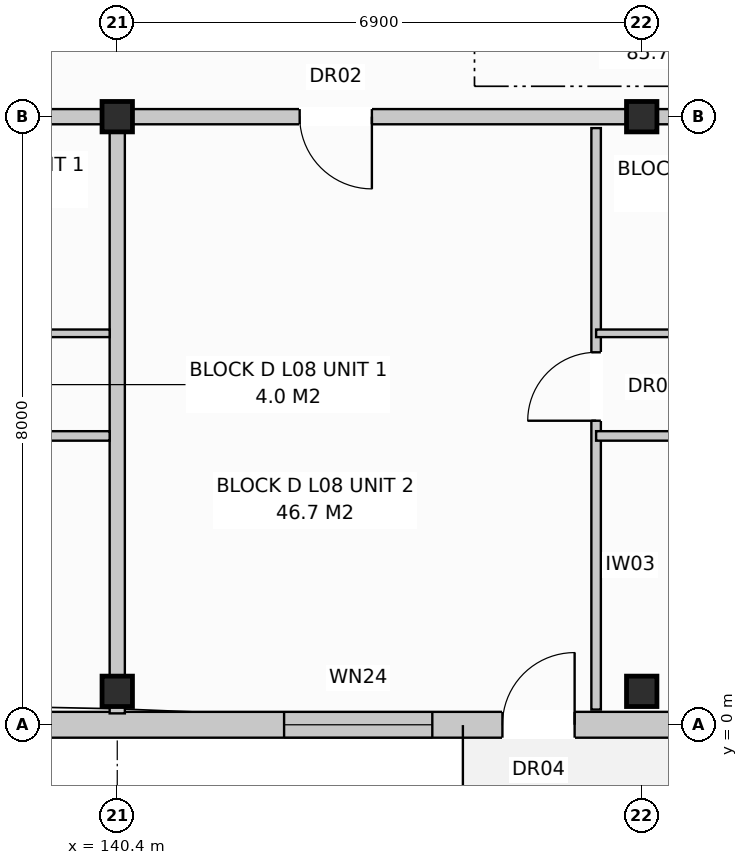
"""IFC4 building model, lengths in metres.
Left out: names, types, materials, properties, quantities, classifications, styles, units other than length and angle.
Written with IfcOpenShell. Run it as: python <this file> out.ifc"""

import sys

from ifc_helpers import new_model, si_unit, direction, frame, frame_2d, origin, origin_with_axes, origin_2d, place, context, subcontext, project, spatial, rectangle, extrude, element, fill, save


model = new_model("IFC4")
c1 = context("Model", 3, precision=1e-05, world=origin(), true_north=direction((0.0, 1.0)))
c2 = subcontext(c1, "Body", "Model", "MODEL_VIEW")
j1 = project(units=[si_unit("LENGTHUNIT", "METRE"), si_unit("PLANEANGLEUNIT", "RADIAN")], contexts=[c1])
p1 = place(None, origin())
s1 = spatial("IfcSite", under=j1, at=p1, CompositionType="ELEMENT")
p2 = place(p1, origin())
s2 = spatial("IfcBuilding", under=s1, at=p2, CompositionType="ELEMENT")
p3 = place(p2, frame((0.0, 0.0, 27.2)))
s3 = spatial("IfcBuildingStorey", under=s2, at=p3, CompositionType="ELEMENT", Elevation=27.2)
for number, where, z_axis, x_axis in (
    (1, (140.4, 0.44, 0.0), (0.0, 0.0, 1.0), (1.0, 0.0, 0.0)),
    (2, (140.4, 8.0, 0.0), (0.0, 0.0, 1.0), (1.0, 0.0, 0.0)),
    (3, (147.3, 0.44, 0.0), (0.0, 0.0, 1.0), (1.0, 0.0, 0.0)),
    (4, (147.3, 8.0, 0.0), (0.0, 0.0, 1.0), (1.0, 0.0, 0.0)),
):
    element("IfcColumn", number, at=place(p3, frame(where, z_axis=z_axis, x_axis=x_axis)), inside=s3, PredefinedType="COLUMN", context=c2, shape_type="SweptSolid", body=[
        extrude(rectangle(XDim=0.4, YDim=0.4, at=origin_2d()), origin(), (0.0, 0.0, 1.0), 3.2),
    ])
p4 = place(p3, frame((126.76, 0.0, 0.0), z_axis=(0.0, 0.0, 1.0), x_axis=(1.0, 0.0, 0.0)))
e5 = element("IfcWall", 5, at=p4, inside=s3, PredefinedType="STANDARD", context=c2, shape_type="SweptSolid", body=[
    extrude(rectangle(XDim=41.08, YDim=0.34, at=frame_2d((20.54, 0.0))), origin(), (0.0, 0.0, 1.0), 2.91),
])
p5 = place(p4, frame((7.41, 0.0, 0.0)))
e6 = element("IfcOpeningElement", 6, at=p5, cuts=e5, PredefinedType="OPENING", context=c2, shape_type="SweptSolid", body=[
    extrude(rectangle(XDim=0.95, YDim=2.1, at=frame_2d((0.475, 1.05))), frame((0.0, 0.182, 0.0), z_axis=(0.0, -1.0, 0.0), x_axis=(1.0, 0.0, 0.0)), (0.0, 0.0, 1.0), 0.364),
])
p6 = place(p4, frame((18.707, 0.0, 0.0)))
e7 = element("IfcOpeningElement", 7, at=p6, cuts=e5, PredefinedType="OPENING", context=c2, shape_type="SweptSolid", body=[
    extrude(rectangle(XDim=0.95, YDim=2.1, at=frame_2d((0.475, 1.05))), frame((0.0, 0.182, 0.0), z_axis=(0.0, -1.0, 0.0), x_axis=(1.0, 0.0, 0.0)), (0.0, 0.0, 1.0), 0.364),
])
p7 = place(p4, frame((32.707, 0.0, 0.0)))
e8 = element("IfcOpeningElement", 8, at=p7, cuts=e5, PredefinedType="OPENING", context=c2, shape_type="SweptSolid", body=[
    extrude(rectangle(XDim=0.95, YDim=2.1, at=frame_2d((0.475, 1.05))), frame((0.0, 0.182, 0.0), z_axis=(0.0, -1.0, 0.0), x_axis=(1.0, 0.0, 0.0)), (0.0, 0.0, 1.0), 0.364),
])
p8 = place(p4, frame((1.61, 0.0, 0.8)))
e9 = element("IfcOpeningElement", 9, at=p8, cuts=e5, PredefinedType="OPENING", context=c2, shape_type="SweptSolid", body=[
    extrude(rectangle(XDim=1.8, YDim=1.7, at=frame_2d((0.9, 0.85))), frame((0.0, 0.182, 0.0), z_axis=(0.0, -1.0, 0.0), x_axis=(1.0, 0.0, 0.0)), (0.0, 0.0, 1.0), 0.364),
])
p9 = place(p4, frame((10.46, 0.0, 0.8)))
e10 = element("IfcOpeningElement", 10, at=p9, cuts=e5, PredefinedType="OPENING", context=c2, shape_type="SweptSolid", body=[
    extrude(rectangle(XDim=1.9, YDim=1.85, at=frame_2d((0.95, 0.925))), frame((0.0, 0.182, 0.0), z_axis=(0.0, -1.0, 0.0), x_axis=(1.0, 0.0, 0.0)), (0.0, 0.0, 1.0), 0.364),
])
p10 = place(p4, frame((15.835, 0.0, 0.8)))
e11 = element("IfcOpeningElement", 11, at=p10, cuts=e5, PredefinedType="OPENING", context=c2, shape_type="SweptSolid", body=[
    extrude(rectangle(XDim=1.95, YDim=1.65, at=frame_2d((0.975, 0.825))), frame((0.0, 0.182, 0.0), z_axis=(0.0, -1.0, 0.0), x_axis=(1.0, 0.0, 0.0)), (0.0, 0.0, 1.0), 0.364),
])
p11 = place(p4, frame((21.96, 0.0, 0.72)))
e12 = element("IfcOpeningElement", 12, at=p11, cuts=e5, PredefinedType="OPENING", context=c2, shape_type="SweptSolid", body=[
    extrude(rectangle(XDim=1.1, YDim=1.5, at=frame_2d((0.55, 0.75))), frame((0.0, 0.182, 0.0), z_axis=(0.0, -1.0, 0.0), x_axis=(1.0, 0.0, 0.0)), (0.0, 0.0, 1.0), 0.364),
])
p12 = place(p4, frame((27.96, 0.0, 0.8)))
e13 = element("IfcOpeningElement", 13, at=p12, cuts=e5, PredefinedType="OPENING", context=c2, shape_type="SweptSolid", body=[
    extrude(rectangle(XDim=1.9, YDim=1.85, at=frame_2d((0.95, 0.925))), frame((0.0, 0.182, 0.0), z_axis=(0.0, -1.0, 0.0), x_axis=(1.0, 0.0, 0.0)), (0.0, 0.0, 1.0), 0.364),
])
p13 = place(p4, frame((30.81, 0.0, 0.85)))
e14 = element("IfcOpeningElement", 14, at=p13, cuts=e5, PredefinedType="OPENING", context=c2, shape_type="SweptSolid", body=[
    extrude(rectangle(XDim=1.5, YDim=1.65, at=frame_2d((0.75, 0.825))), frame((0.0, 0.182, 0.0), z_axis=(0.0, -1.0, 0.0), x_axis=(1.0, 0.0, 0.0)), (0.0, 0.0, 1.0), 0.364),
])
p14 = place(p4, frame((35.76, 0.0, 0.72)))
e15 = element("IfcOpeningElement", 15, at=p14, cuts=e5, PredefinedType="OPENING", context=c2, shape_type="SweptSolid", body=[
    extrude(rectangle(XDim=1.1, YDim=1.5, at=frame_2d((0.55, 0.75))), frame((0.0, 0.182, 0.0), z_axis=(0.0, -1.0, 0.0), x_axis=(1.0, 0.0, 0.0)), (0.0, 0.0, 1.0), 0.364),
])
p15 = place(p4, frame((38.575, 0.0, 0.8)))
e16 = element("IfcOpeningElement", 16, at=p15, cuts=e5, PredefinedType="OPENING", context=c2, shape_type="SweptSolid", body=[
    extrude(rectangle(XDim=1.9, YDim=1.85, at=frame_2d((0.95, 0.925))), frame((0.0, 0.182, 0.0), z_axis=(0.0, -1.0, 0.0), x_axis=(1.0, 0.0, 0.0)), (0.0, 0.0, 1.0), 0.364),
])
p16 = place(p3, frame((140.4, 7.85, 0.0), z_axis=(0.0, 0.0, 1.0), x_axis=(0.0, -1.0, 0.0)))
e17 = element("IfcWall", 17, at=p16, inside=s3, PredefinedType="PARTITIONING", context=c2, shape_type="SweptSolid", body=[
    extrude(rectangle(XDim=7.7, YDim=0.2, at=frame_2d((3.85, 0.0))), origin(), (0.0, 0.0, 1.0), 2.96),
])
p17 = place(p3, frame((126.6, 8.0, 0.0), z_axis=(0.0, 0.0, 1.0), x_axis=(1.0, 0.0, 0.0)))
e18 = element("IfcWall", 18, at=p17, inside=s3, PredefinedType="PARTITIONING", context=c2, shape_type="SweptSolid", body=[
    extrude(rectangle(XDim=13.8, YDim=0.2, at=frame_2d((6.9, 0.0))), origin(), (0.0, 0.0, 1.0), 2.35),
])
p18 = place(p17, frame((2.4, 0.0, 0.0)))
e19 = element("IfcOpeningElement", 19, at=p18, cuts=e18, PredefinedType="OPENING", context=c2, shape_type="SweptSolid", body=[
    extrude(rectangle(XDim=0.95, YDim=2.15, at=frame_2d((0.475, 1.075))), frame((0.0, 0.112, 0.0), z_axis=(0.0, -1.0, 0.0), x_axis=(1.0, 0.0, 0.0)), (0.0, 0.0, 1.0), 0.224),
])
p19 = place(p3, frame((131.8, 5.15, 0.0), z_axis=(0.0, 0.0, 1.0), x_axis=(1.0, 0.0, 0.0)))
e20 = element("IfcWall", 20, at=p19, inside=s3, PredefinedType="PARTITIONING", context=c2, shape_type="SweptSolid", body=[
    extrude(rectangle(XDim=8.5, YDim=0.1, at=frame_2d((4.25, 0.0))), origin(), (0.0, 0.0, 1.0), 2.96),
])
p20 = place(p19, frame((1.0, 0.0, 0.0)))
e21 = element("IfcOpeningElement", 21, at=p20, cuts=e20, PredefinedType="OPENING", context=c2, shape_type="SweptSolid", body=[
    extrude(rectangle(XDim=0.85, YDim=2.1, at=frame_2d((0.425, 1.05))), frame((0.0, 0.062, 0.0), z_axis=(0.0, -1.0, 0.0), x_axis=(1.0, 0.0, 0.0)), (0.0, 0.0, 1.0), 0.124),
])
p21 = place(p19, frame((3.4, 0.0, 0.0)))
e22 = element("IfcOpeningElement", 22, at=p21, cuts=e20, PredefinedType="OPENING", context=c2, shape_type="SweptSolid", body=[
    extrude(rectangle(XDim=0.85, YDim=2.05, at=frame_2d((0.425, 1.025))), frame((0.0, 0.062, 0.0), z_axis=(0.0, -1.0, 0.0), x_axis=(1.0, 0.0, 0.0)), (0.0, 0.0, 1.0), 0.124),
])
p22 = place(p19, frame((6.2, 0.0, 0.0)))
e23 = element("IfcOpeningElement", 23, at=p22, cuts=e20, PredefinedType="OPENING", context=c2, shape_type="SweptSolid", body=[
    extrude(rectangle(XDim=0.85, YDim=2.05, at=frame_2d((0.425, 1.025))), frame((0.0, 0.062, 0.0), z_axis=(0.0, -1.0, 0.0), x_axis=(1.0, 0.0, 0.0)), (0.0, 0.0, 1.0), 0.124),
])
p23 = place(p3, frame((131.8, 3.8, 0.0), z_axis=(0.0, 0.0, 1.0), x_axis=(1.0, 0.0, 0.0)))
e24 = element("IfcWall", 24, at=p23, inside=s3, PredefinedType="PARTITIONING", context=c2, shape_type="SweptSolid", body=[
    extrude(rectangle(XDim=8.5, YDim=0.125, at=frame_2d((4.25, 0.0))), origin(), (0.0, 0.0, 1.0), 2.96),
])
p24 = place(p23, frame((1.5, 0.0, 0.0)))
e25 = element("IfcOpeningElement", 25, at=p24, cuts=e24, PredefinedType="OPENING", context=c2, shape_type="SweptSolid", body=[
    extrude(rectangle(XDim=0.9, YDim=2.1, at=frame_2d((0.45, 1.05))), frame((0.0, 0.074, 0.0), z_axis=(0.0, -1.0, 0.0), x_axis=(1.0, 0.0, 0.0)), (0.0, 0.0, 1.0), 0.149),
])
p25 = place(p23, frame((5.6, 0.0, 0.0)))
e26 = element("IfcOpeningElement", 26, at=p25, cuts=e24, PredefinedType="OPENING", context=c2, shape_type="SweptSolid", body=[
    extrude(rectangle(XDim=0.9, YDim=2.1, at=frame_2d((0.45, 1.05))), frame((0.0, 0.074, 0.0), z_axis=(0.0, -1.0, 0.0), x_axis=(1.0, 0.0, 0.0)), (0.0, 0.0, 1.0), 0.149),
])
p26 = place(p3, frame((140.4, 8.0, 0.0), z_axis=(0.0, 0.0, 1.0), x_axis=(1.0, 0.0, 0.0)))
e27 = element("IfcWall", 27, at=p26, inside=s3, PredefinedType="PARTITIONING", context=c2, shape_type="SweptSolid", body=[
    extrude(rectangle(XDim=20.7, YDim=0.2, at=frame_2d((10.35, 0.0))), origin(), (0.0, 0.0, 1.0), 2.35),
])
p27 = place(p26, frame((2.4, 0.0, 0.0)))
e28 = element("IfcOpeningElement", 28, at=p27, cuts=e27, PredefinedType="OPENING", context=c2, shape_type="SweptSolid", body=[
    extrude(rectangle(XDim=0.95, YDim=2.15, at=frame_2d((0.475, 1.075))), frame((0.0, 0.112, 0.0), z_axis=(0.0, -1.0, 0.0), x_axis=(1.0, 0.0, 0.0)), (0.0, 0.0, 1.0), 0.224),
])
p28 = place(p3, frame((146.7, 7.85, 0.0), z_axis=(0.0, 0.0, 1.0), x_axis=(0.0, -1.0, 0.0)))
e29 = element("IfcWall", 29, at=p28, inside=s3, PredefinedType="PARTITIONING", context=c2, shape_type="SweptSolid", body=[
    extrude(rectangle(XDim=7.65, YDim=0.125, at=frame_2d((3.825, 0.0))), origin(), (0.0, 0.0, 1.0), 2.96),
])
p29 = place(p28, frame((2.95, 0.0, 0.0)))
e30 = element("IfcOpeningElement", 30, at=p29, cuts=e29, PredefinedType="OPENING", context=c2, shape_type="SweptSolid", body=[
    extrude(rectangle(XDim=0.9, YDim=2.1, at=frame_2d((0.45, 1.05))), frame((0.0, 0.074, 0.0), z_axis=(0.0, -1.0, 0.0), x_axis=(1.0, 0.0, 0.0)), (0.0, 0.0, 1.0), 0.149),
])
p30 = place(p3, frame((146.7, 5.15, 0.0), z_axis=(0.0, 0.0, 1.0), x_axis=(1.0, 0.0, 0.0)))
e31 = element("IfcWall", 31, at=p30, inside=s3, PredefinedType="PARTITIONING", context=c2, shape_type="SweptSolid", body=[
    extrude(rectangle(XDim=14.3, YDim=0.1, at=frame_2d((7.15, 0.0))), origin(), (0.0, 0.0, 1.0), 2.96),
])
p31 = place(p30, frame((1.6, 0.0, 0.0)))
e32 = element("IfcOpeningElement", 32, at=p31, cuts=e31, PredefinedType="OPENING", context=c2, shape_type="SweptSolid", body=[
    extrude(rectangle(XDim=0.9, YDim=2.1, at=frame_2d((0.45, 1.05))), frame((0.0, 0.062, 0.0), z_axis=(0.0, -1.0, 0.0), x_axis=(1.0, 0.0, 0.0)), (0.0, 0.0, 1.0), 0.124),
])
p32 = place(p30, frame((5.1, 0.0, 0.0)))
e33 = element("IfcOpeningElement", 33, at=p32, cuts=e31, PredefinedType="OPENING", context=c2, shape_type="SweptSolid", body=[
    extrude(rectangle(XDim=0.85, YDim=2.05, at=frame_2d((0.425, 1.025))), frame((0.0, 0.062, 0.0), z_axis=(0.0, -1.0, 0.0), x_axis=(1.0, 0.0, 0.0)), (0.0, 0.0, 1.0), 0.124),
])
p33 = place(p30, frame((8.2, 0.0, 0.0)))
e34 = element("IfcOpeningElement", 34, at=p33, cuts=e31, PredefinedType="OPENING", context=c2, shape_type="SweptSolid", body=[
    extrude(rectangle(XDim=0.85, YDim=2.05, at=frame_2d((0.425, 1.025))), frame((0.0, 0.062, 0.0), z_axis=(0.0, -1.0, 0.0), x_axis=(1.0, 0.0, 0.0)), (0.0, 0.0, 1.0), 0.124),
])
p34 = place(p30, frame((11.6, 0.0, 0.0)))
e35 = element("IfcOpeningElement", 35, at=p34, cuts=e31, PredefinedType="OPENING", context=c2, shape_type="SweptSolid", body=[
    extrude(rectangle(XDim=0.85, YDim=2.05, at=frame_2d((0.425, 1.025))), frame((0.0, 0.062, 0.0), z_axis=(0.0, -1.0, 0.0), x_axis=(1.0, 0.0, 0.0)), (0.0, 0.0, 1.0), 0.124),
])
p35 = place(p3, frame((146.7, 3.8, 0.0), z_axis=(0.0, 0.0, 1.0), x_axis=(1.0, 0.0, 0.0)))
e36 = element("IfcWall", 36, at=p35, inside=s3, PredefinedType="PARTITIONING", context=c2, shape_type="SweptSolid", body=[
    extrude(rectangle(XDim=10.4, YDim=0.125, at=frame_2d((5.2, 0.0))), origin(), (0.0, 0.0, 1.0), 2.96),
])
p36 = place(p35, frame((2.0, 0.0, 0.0)))
e37 = element("IfcOpeningElement", 37, at=p36, cuts=e36, PredefinedType="OPENING", context=c2, shape_type="SweptSolid", body=[
    extrude(rectangle(XDim=0.9, YDim=2.1, at=frame_2d((0.45, 1.05))), frame((0.0, 0.074, 0.0), z_axis=(0.0, -1.0, 0.0), x_axis=(1.0, 0.0, 0.0)), (0.0, 0.0, 1.0), 0.149),
])
p37 = place(p35, frame((7.2, 0.0, 0.0)))
e38 = element("IfcOpeningElement", 38, at=p37, cuts=e36, PredefinedType="OPENING", context=c2, shape_type="SweptSolid", body=[
    extrude(rectangle(XDim=0.9, YDim=2.1, at=frame_2d((0.45, 1.05))), frame((0.0, 0.074, 0.0), z_axis=(0.0, -1.0, 0.0), x_axis=(1.0, 0.0, 0.0)), (0.0, 0.0, 1.0), 0.149),
])
p38 = place(p6, origin_with_axes())
e39 = element("IfcDoor", 39, at=p38, inside=s3, OperationType="SINGLE_SWING_RIGHT", PredefinedType="DOOR", context=c2, shape_type="SweptSolid", body=[
    extrude(rectangle(XDim=0.95, YDim=2.1, at=frame_2d((0.475, 1.05))), frame((0.0, 0.025, 0.0), z_axis=(0.0, -1.0, 0.0), x_axis=(1.0, 0.0, 0.0)), (0.0, 0.0, 1.0), 0.05),
])
fill(e7, e39)
p39 = place(p10, origin_with_axes())
e40 = element("IfcWindow", 40, at=p39, inside=s3, PartitioningType="SINGLE_PANEL", PredefinedType="WINDOW", context=c2, shape_type="SweptSolid", body=[
    extrude(rectangle(XDim=1.95, YDim=1.65, at=frame_2d((0.975, 0.825))), frame((0.0, 0.03, 0.0), z_axis=(0.0, -1.0, 0.0), x_axis=(1.0, 0.0, 0.0)), (0.0, 0.0, 1.0), 0.06),
])
fill(e11, e40)
p40 = place(p27, frame((0.95, 0.0, 0.0), z_axis=(0.0, 0.0, 1.0), x_axis=(-1.0, 0.0, 0.0)))
e41 = element("IfcDoor", 41, at=p40, inside=s3, OperationType="SINGLE_SWING_RIGHT", PredefinedType="DOOR", context=c2, shape_type="SweptSolid", body=[
    extrude(rectangle(XDim=0.95, YDim=2.15, at=frame_2d((0.475, 1.075))), frame((0.0, 0.025, 0.0), z_axis=(0.0, -1.0, 0.0), x_axis=(1.0, 0.0, 0.0)), (0.0, 0.0, 1.0), 0.05),
])
fill(e28, e41)
p41 = place(p29, frame((0.9, 0.0, 0.0), z_axis=(0.0, 0.0, 1.0), x_axis=(-1.0, 0.0, 0.0)))
e42 = element("IfcDoor", 42, at=p41, inside=s3, OperationType="SINGLE_SWING_RIGHT", PredefinedType="DOOR", context=c2, shape_type="SweptSolid", body=[
    extrude(rectangle(XDim=0.9, YDim=2.1, at=frame_2d((0.45, 1.05))), frame((0.0, 0.025, 0.0), z_axis=(0.0, -1.0, 0.0), x_axis=(1.0, 0.0, 0.0)), (0.0, 0.0, 1.0), 0.05),
])
fill(e30, e42)
save(model, sys.argv[1])
